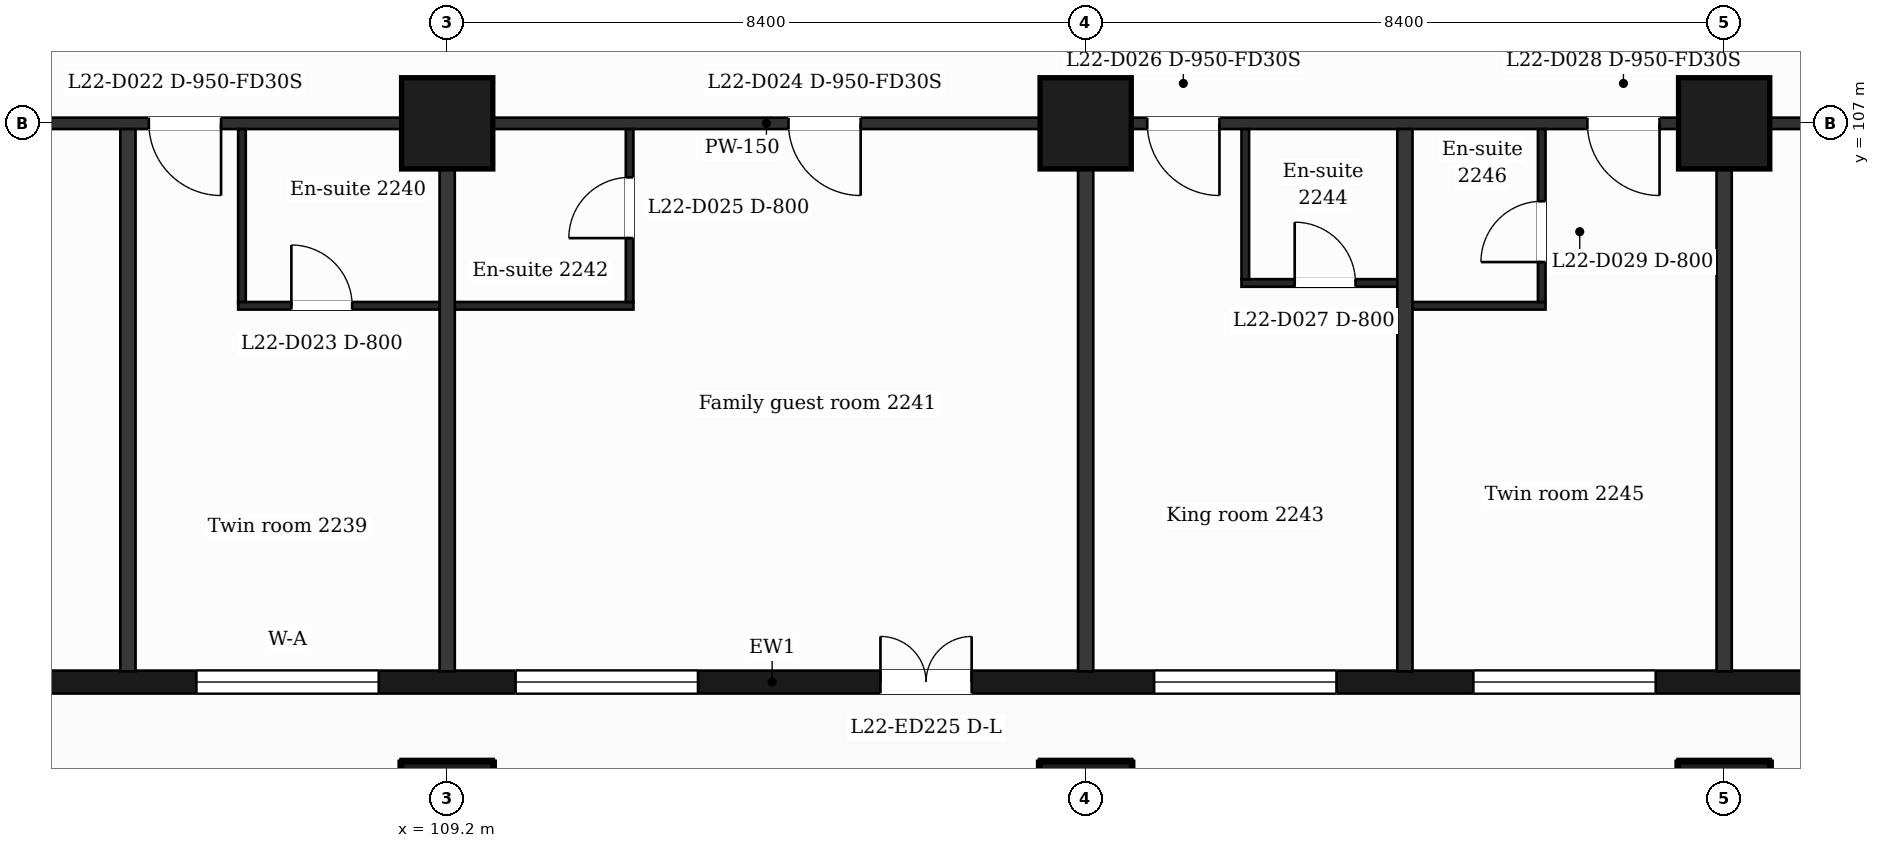
"""IFC4 building model, lengths in metres.
Left out: names, types, materials, properties, quantities, classifications, styles, units other than length and angle.
Written with IfcOpenShell. Run it as: python <this file> out.ifc"""

import sys

from ifc_helpers import new_model, si_unit, direction, frame, frame_2d, origin, origin_2d, place, context, subcontext, project, spatial, rectangle, extrude, element, fill, save


model = new_model("IFC4")
c1 = context("Model", 3, precision=1e-05, world=origin(), true_north=direction((0.0, 1.0)))
c2 = subcontext(c1, "Body", "Model", "MODEL_VIEW")
j1 = project(units=[si_unit("LENGTHUNIT", "METRE"), si_unit("PLANEANGLEUNIT", "RADIAN")], contexts=[c1])
p1 = place(None, origin())
s1 = spatial("IfcSite", under=j1, at=p1, CompositionType="ELEMENT")
p2 = place(p1, origin())
s2 = spatial("IfcBuilding", under=s1, at=p2, CompositionType="ELEMENT")
p3 = place(p2, frame((0.0, 0.0, 98.4)))
s3 = spatial("IfcBuildingStorey", under=s2, at=p3, CompositionType="ELEMENT", Elevation=98.4)
for number, where, z_axis, x_axis in (
    (1, (109.2, 98.0, 0.0), (0.0, 0.0, 1.0), (1.0, 0.0, 0.0)),
    (2, (117.6, 98.0, 0.0), (0.0, 0.0, 1.0), (1.0, 0.0, 0.0)),
    (3, (126.0, 98.0, 0.0), (0.0, 0.0, 1.0), (1.0, 0.0, 0.0)),
    (4, (109.2, 107.0, 0.0), (0.0, 0.0, 1.0), (1.0, 0.0, 0.0)),
    (5, (117.6, 107.0, 0.0), (0.0, 0.0, 1.0), (1.0, 0.0, 0.0)),
    (6, (126.0, 107.0, 0.0), (0.0, 0.0, 1.0), (1.0, 0.0, 0.0)),
):
    element("IfcColumn", number, at=place(p3, frame(where, z_axis=z_axis, x_axis=x_axis)), inside=s3, PredefinedType="COLUMN", context=c2, shape_type="SweptSolid", body=[
        extrude(rectangle(XDim=1.2, YDim=1.2, at=origin_2d()), origin(), (0.0, 0.0, 1.0), 3.7),
    ])
p4 = place(p3, frame((89.85, 99.65, 0.0), z_axis=(0.0, 0.0, 1.0), x_axis=(1.0, 0.0, 0.0)))
e7 = element("IfcWall", 7, at=p4, inside=s3, PredefinedType="SOLIDWALL", context=c2, shape_type="SweptSolid", body=[
    extrude(rectangle(XDim=47.25, YDim=0.3, at=frame_2d((23.625, 0.0))), origin(), (0.0, 0.0, 1.0), 3.38),
])
p5 = place(p4, frame((0.725, 0.0, 0.9)))
e8 = element("IfcOpeningElement", 8, at=p5, cuts=e7, PredefinedType="OPENING", context=c2, shape_type="SweptSolid", body=[
    extrude(rectangle(XDim=1.2, YDim=2.1, at=frame_2d((0.6, 1.05))), frame((0.0, 0.16, 0.0), z_axis=(0.0, -1.0, 0.0), x_axis=(1.0, 0.0, 0.0)), (0.0, 0.0, 1.0), 0.32),
])
p6 = place(p4, frame((3.45, 0.0, 0.9)))
e9 = element("IfcOpeningElement", 9, at=p6, cuts=e7, PredefinedType="OPENING", context=c2, shape_type="SweptSolid", body=[
    extrude(rectangle(XDim=2.4, YDim=2.1, at=frame_2d((1.2, 1.05))), frame((0.0, 0.16, 0.0), z_axis=(0.0, -1.0, 0.0), x_axis=(1.0, 0.0, 0.0)), (0.0, 0.0, 1.0), 0.32),
])
p7 = place(p4, frame((8.25, 0.0, 0.9)))
e10 = element("IfcOpeningElement", 10, at=p7, cuts=e7, PredefinedType="OPENING", context=c2, shape_type="SweptSolid", body=[
    extrude(rectangle(XDim=1.2, YDim=2.1, at=frame_2d((0.6, 1.05))), frame((0.0, 0.16, 0.0), z_axis=(0.0, -1.0, 0.0), x_axis=(1.0, 0.0, 0.0)), (0.0, 0.0, 1.0), 0.32),
])
p8 = place(p4, frame((12.45, 0.0, 0.9)))
e11 = element("IfcOpeningElement", 11, at=p8, cuts=e7, PredefinedType="OPENING", context=c2, shape_type="SweptSolid", body=[
    extrude(rectangle(XDim=1.2, YDim=2.1, at=frame_2d((0.6, 1.05))), frame((0.0, 0.16, 0.0), z_axis=(0.0, -1.0, 0.0), x_axis=(1.0, 0.0, 0.0)), (0.0, 0.0, 1.0), 0.32),
])
p9 = place(p4, frame((16.05, 0.0, 0.9)))
e12 = element("IfcOpeningElement", 12, at=p9, cuts=e7, PredefinedType="OPENING", context=c2, shape_type="SweptSolid", body=[
    extrude(rectangle(XDim=2.4, YDim=2.1, at=frame_2d((1.2, 1.05))), frame((0.0, 0.16, 0.0), z_axis=(0.0, -1.0, 0.0), x_axis=(1.0, 0.0, 0.0)), (0.0, 0.0, 1.0), 0.32),
])
p10 = place(p4, frame((20.25, 0.0, 0.9)))
e13 = element("IfcOpeningElement", 13, at=p10, cuts=e7, PredefinedType="OPENING", context=c2, shape_type="SweptSolid", body=[
    extrude(rectangle(XDim=2.4, YDim=2.1, at=frame_2d((1.2, 1.05))), frame((0.0, 0.16, 0.0), z_axis=(0.0, -1.0, 0.0), x_axis=(1.0, 0.0, 0.0)), (0.0, 0.0, 1.0), 0.32),
])
p11 = place(p4, frame((25.05, 0.0, 0.0)))
e14 = element("IfcOpeningElement", 14, at=p11, cuts=e7, PredefinedType="OPENING", context=c2, shape_type="SweptSolid", body=[
    extrude(rectangle(XDim=1.2, YDim=2.4, at=frame_2d((0.6, 1.2))), frame((0.0, 0.16, 0.0), z_axis=(0.0, -1.0, 0.0), x_axis=(1.0, 0.0, 0.0)), (0.0, 0.0, 1.0), 0.32),
])
p12 = place(p4, frame((28.65, 0.0, 0.9)))
e15 = element("IfcOpeningElement", 15, at=p12, cuts=e7, PredefinedType="OPENING", context=c2, shape_type="SweptSolid", body=[
    extrude(rectangle(XDim=2.4, YDim=2.1, at=frame_2d((1.2, 1.05))), frame((0.0, 0.16, 0.0), z_axis=(0.0, -1.0, 0.0), x_axis=(1.0, 0.0, 0.0)), (0.0, 0.0, 1.0), 0.32),
])
p13 = place(p4, frame((32.85, 0.0, 0.9)))
e16 = element("IfcOpeningElement", 16, at=p13, cuts=e7, PredefinedType="OPENING", context=c2, shape_type="SweptSolid", body=[
    extrude(rectangle(XDim=2.4, YDim=2.1, at=frame_2d((1.2, 1.05))), frame((0.0, 0.16, 0.0), z_axis=(0.0, -1.0, 0.0), x_axis=(1.0, 0.0, 0.0)), (0.0, 0.0, 1.0), 0.32),
])
p14 = place(p4, frame((37.65, 0.0, 0.9)))
e17 = element("IfcOpeningElement", 17, at=p14, cuts=e7, PredefinedType="OPENING", context=c2, shape_type="SweptSolid", body=[
    extrude(rectangle(XDim=1.2, YDim=2.1, at=frame_2d((0.6, 1.05))), frame((0.0, 0.16, 0.0), z_axis=(0.0, -1.0, 0.0), x_axis=(1.0, 0.0, 0.0)), (0.0, 0.0, 1.0), 0.32),
])
p15 = place(p4, frame((41.85, 0.0, 0.9)))
e18 = element("IfcOpeningElement", 18, at=p15, cuts=e7, PredefinedType="OPENING", context=c2, shape_type="SweptSolid", body=[
    extrude(rectangle(XDim=1.2, YDim=2.1, at=frame_2d((0.6, 1.05))), frame((0.0, 0.16, 0.0), z_axis=(0.0, -1.0, 0.0), x_axis=(1.0, 0.0, 0.0)), (0.0, 0.0, 1.0), 0.32),
])
p16 = place(p4, frame((45.25, 0.0, 0.9)))
e19 = element("IfcOpeningElement", 19, at=p16, cuts=e7, PredefinedType="OPENING", context=c2, shape_type="SweptSolid", body=[
    extrude(rectangle(XDim=1.2, YDim=2.1, at=frame_2d((0.6, 1.05))), frame((0.0, 0.16, 0.0), z_axis=(0.0, -1.0, 0.0), x_axis=(1.0, 0.0, 0.0)), (0.0, 0.0, 1.0), 0.32),
])
p17 = place(p3, frame((106.45, 104.6, 0.0), z_axis=(0.0, 0.0, 1.0), x_axis=(1.0, 0.0, 0.0)))
e20 = element("IfcWall", 20, at=p17, inside=s3, PredefinedType="PARTITIONING", context=c2, shape_type="SweptSolid", body=[
    extrude(rectangle(XDim=5.2, YDim=0.1, at=frame_2d((2.6, 0.0))), origin(), (0.0, 0.0, 1.0), 3.38),
])
p18 = place(p17, frame((0.7, 0.0, 0.0)))
e21 = element("IfcOpeningElement", 21, at=p18, cuts=e20, PredefinedType="OPENING", context=c2, shape_type="SweptSolid", body=[
    extrude(rectangle(XDim=0.8, YDim=2.1, at=frame_2d((0.4, 1.05))), frame((0.0, 0.06, 0.0), z_axis=(0.0, -1.0, 0.0), x_axis=(1.0, 0.0, 0.0)), (0.0, 0.0, 1.0), 0.12),
])
p19 = place(p3, frame((121.8, 104.6, 0.0), z_axis=(0.0, 0.0, 1.0), x_axis=(1.0, 0.0, 0.0)))
e22 = element("IfcWall", 22, at=p19, inside=s3, PredefinedType="PARTITIONING", context=c2, shape_type="SweptSolid", body=[
    extrude(rectangle(XDim=1.85, YDim=0.1, at=frame_2d((0.925, 0.0))), origin(), (0.0, 0.0, 1.0), 3.38),
])
p20 = place(p3, frame((119.65, 104.9, 0.0), z_axis=(0.0, 0.0, 1.0), x_axis=(1.0, 0.0, 0.0)))
e23 = element("IfcWall", 23, at=p20, inside=s3, PredefinedType="PARTITIONING", context=c2, shape_type="SweptSolid", body=[
    extrude(rectangle(XDim=2.15, YDim=0.1, at=frame_2d((1.075, 0.0))), origin(), (0.0, 0.0, 1.0), 3.38),
])
p21 = place(p20, frame((0.7, 0.0, 0.0)))
e24 = element("IfcOpeningElement", 24, at=p21, cuts=e23, PredefinedType="OPENING", context=c2, shape_type="SweptSolid", body=[
    extrude(rectangle(XDim=0.8, YDim=2.1, at=frame_2d((0.4, 1.05))), frame((0.0, 0.06, 0.0), z_axis=(0.0, -1.0, 0.0), x_axis=(1.0, 0.0, 0.0)), (0.0, 0.0, 1.0), 0.12),
])
p22 = place(p3, frame((87.018, 107.0, 0.0), z_axis=(0.0, 0.0, 1.0), x_axis=(1.0, 0.0, 0.0)))
e25 = element("IfcWall", 25, at=p22, inside=s3, PredefinedType="PARTITIONING", context=c2, shape_type="SweptSolid", body=[
    extrude(rectangle(XDim=52.765, YDim=0.15, at=frame_2d((26.382, 0.0))), origin(), (0.0, 0.0, 1.0), 3.38),
])
p23 = place(p22, frame((1.276, 0.0, 0.0)))
e26 = element("IfcOpeningElement", 26, at=p23, cuts=e25, PredefinedType="OPENING", context=c2, shape_type="SweptSolid", body=[
    extrude(rectangle(XDim=0.95, YDim=2.1, at=frame_2d((0.475, 1.05))), frame((0.0, 0.085, 0.0), z_axis=(0.0, -1.0, 0.0), x_axis=(1.0, 0.0, 0.0)), (0.0, 0.0, 1.0), 0.17),
])
p24 = place(p22, frame((6.152, 0.0, 0.0)))
e27 = element("IfcOpeningElement", 27, at=p24, cuts=e25, PredefinedType="OPENING", context=c2, shape_type="SweptSolid", body=[
    extrude(rectangle(XDim=0.95, YDim=2.1, at=frame_2d((0.475, 1.05))), frame((0.0, 0.085, 0.0), z_axis=(0.0, -1.0, 0.0), x_axis=(1.0, 0.0, 0.0)), (0.0, 0.0, 1.0), 0.17),
])
p25 = place(p22, frame((14.59, 0.0, 0.0)))
e28 = element("IfcOpeningElement", 28, at=p25, cuts=e25, PredefinedType="OPENING", context=c2, shape_type="SweptSolid", body=[
    extrude(rectangle(XDim=0.95, YDim=2.1, at=frame_2d((0.475, 1.05))), frame((0.0, 0.085, 0.0), z_axis=(0.0, -1.0, 0.0), x_axis=(1.0, 0.0, 0.0)), (0.0, 0.0, 1.0), 0.17),
])
p26 = place(p22, frame((18.257, 0.0, 0.0)))
e29 = element("IfcOpeningElement", 29, at=p26, cuts=e25, PredefinedType="OPENING", context=c2, shape_type="SweptSolid", body=[
    extrude(rectangle(XDim=0.95, YDim=2.1, at=frame_2d((0.475, 1.05))), frame((0.0, 0.085, 0.0), z_axis=(0.0, -1.0, 0.0), x_axis=(1.0, 0.0, 0.0)), (0.0, 0.0, 1.0), 0.17),
])
p27 = place(p22, frame((26.672, 0.0, 0.0)))
e30 = element("IfcOpeningElement", 30, at=p27, cuts=e25, PredefinedType="OPENING", context=c2, shape_type="SweptSolid", body=[
    extrude(rectangle(XDim=0.95, YDim=2.1, at=frame_2d((0.475, 1.05))), frame((0.0, 0.085, 0.0), z_axis=(0.0, -1.0, 0.0), x_axis=(1.0, 0.0, 0.0)), (0.0, 0.0, 1.0), 0.17),
])
p28 = place(p22, frame((31.392, 0.0, 0.0)))
e31 = element("IfcOpeningElement", 31, at=p28, cuts=e25, PredefinedType="OPENING", context=c2, shape_type="SweptSolid", body=[
    extrude(rectangle(XDim=0.95, YDim=2.1, at=frame_2d((0.475, 1.05))), frame((0.0, 0.085, 0.0), z_axis=(0.0, -1.0, 0.0), x_axis=(1.0, 0.0, 0.0)), (0.0, 0.0, 1.0), 0.17),
])
p29 = place(p22, frame((37.182, 0.0, 0.0)))
e32 = element("IfcOpeningElement", 32, at=p29, cuts=e25, PredefinedType="OPENING", context=c2, shape_type="SweptSolid", body=[
    extrude(rectangle(XDim=0.95, YDim=2.1, at=frame_2d((0.475, 1.05))), frame((0.0, 0.085, 0.0), z_axis=(0.0, -1.0, 0.0), x_axis=(1.0, 0.0, 0.0)), (0.0, 0.0, 1.0), 0.17),
])
p30 = place(p22, frame((41.762, 0.0, 0.0)))
e33 = element("IfcOpeningElement", 33, at=p30, cuts=e25, PredefinedType="OPENING", context=c2, shape_type="SweptSolid", body=[
    extrude(rectangle(XDim=0.95, YDim=2.1, at=frame_2d((0.475, 1.05))), frame((0.0, 0.085, 0.0), z_axis=(0.0, -1.0, 0.0), x_axis=(1.0, 0.0, 0.0)), (0.0, 0.0, 1.0), 0.17),
])
p31 = place(p22, frame((49.285, 0.0, 0.0)))
e34 = element("IfcOpeningElement", 34, at=p31, cuts=e25, PredefinedType="OPENING", context=c2, shape_type="SweptSolid", body=[
    extrude(rectangle(XDim=0.95, YDim=2.1, at=frame_2d((0.475, 1.05))), frame((0.0, 0.085, 0.0), z_axis=(0.0, -1.0, 0.0), x_axis=(1.0, 0.0, 0.0)), (0.0, 0.0, 1.0), 0.17),
])
p32 = place(p3, frame((105.0, 99.79, 0.0), z_axis=(0.0, 0.0, 1.0), x_axis=(0.0, 1.0, 0.0)))
e35 = element("IfcWall", 35, at=p32, inside=s3, PredefinedType="PARTITIONING", context=c2, shape_type="SweptSolid", body=[
    extrude(rectangle(XDim=7.135, YDim=0.2, at=frame_2d((3.567, 0.0))), origin(), (0.0, 0.0, 1.0), 3.38),
])
p33 = place(p3, frame((106.5, 104.65, 0.0), z_axis=(0.0, 0.0, 1.0), x_axis=(0.0, 1.0, 0.0)))
e36 = element("IfcWall", 36, at=p33, inside=s3, PredefinedType="PARTITIONING", context=c2, shape_type="SweptSolid", body=[
    extrude(rectangle(XDim=2.275, YDim=0.1, at=frame_2d((1.138, 0.0))), origin(), (0.0, 0.0, 1.0), 3.38),
])
p34 = place(p3, frame((109.2, 99.79, 0.0), z_axis=(0.0, 0.0, 1.0), x_axis=(0.0, 1.0, 0.0)))
e37 = element("IfcWall", 37, at=p34, inside=s3, PredefinedType="PARTITIONING", context=c2, shape_type="SweptSolid", body=[
    extrude(rectangle(XDim=7.135, YDim=0.2, at=frame_2d((3.567, 0.0))), origin(), (0.0, 0.0, 1.0), 3.38),
])
p35 = place(p3, frame((111.6, 104.65, 0.0), z_axis=(0.0, 0.0, 1.0), x_axis=(0.0, 1.0, 0.0)))
e38 = element("IfcWall", 38, at=p35, inside=s3, PredefinedType="PARTITIONING", context=c2, shape_type="SweptSolid", body=[
    extrude(rectangle(XDim=2.275, YDim=0.1, at=frame_2d((1.138, 0.0))), origin(), (0.0, 0.0, 1.0), 3.38),
])
p36 = place(p35, frame((0.84, 0.0, 0.0)))
e39 = element("IfcOpeningElement", 39, at=p36, cuts=e38, PredefinedType="OPENING", context=c2, shape_type="SweptSolid", body=[
    extrude(rectangle(XDim=0.8, YDim=2.1, at=frame_2d((0.4, 1.05))), frame((0.0, 0.06, 0.0), z_axis=(0.0, -1.0, 0.0), x_axis=(1.0, 0.0, 0.0)), (0.0, 0.0, 1.0), 0.12),
])
p37 = place(p3, frame((117.6, 99.79, 0.0), z_axis=(0.0, 0.0, 1.0), x_axis=(0.0, 1.0, 0.0)))
e40 = element("IfcWall", 40, at=p37, inside=s3, PredefinedType="PARTITIONING", context=c2, shape_type="SweptSolid", body=[
    extrude(rectangle(XDim=7.135, YDim=0.2, at=frame_2d((3.567, 0.0))), origin(), (0.0, 0.0, 1.0), 3.38),
])
p38 = place(p3, frame((119.7, 104.95, 0.0), z_axis=(0.0, 0.0, 1.0), x_axis=(0.0, 1.0, 0.0)))
e41 = element("IfcWall", 41, at=p38, inside=s3, PredefinedType="PARTITIONING", context=c2, shape_type="SweptSolid", body=[
    extrude(rectangle(XDim=1.975, YDim=0.1, at=frame_2d((0.988, 0.0))), origin(), (0.0, 0.0, 1.0), 3.38),
])
p39 = place(p3, frame((121.8, 99.79, 0.0), z_axis=(0.0, 0.0, 1.0), x_axis=(0.0, 1.0, 0.0)))
e42 = element("IfcWall", 42, at=p39, inside=s3, PredefinedType="PARTITIONING", context=c2, shape_type="SweptSolid", body=[
    extrude(rectangle(XDim=7.135, YDim=0.2, at=frame_2d((3.567, 0.0))), origin(), (0.0, 0.0, 1.0), 3.38),
])
p40 = place(p3, frame((123.6, 104.65, 0.0), z_axis=(0.0, 0.0, 1.0), x_axis=(0.0, 1.0, 0.0)))
e43 = element("IfcWall", 43, at=p40, inside=s3, PredefinedType="PARTITIONING", context=c2, shape_type="SweptSolid", body=[
    extrude(rectangle(XDim=2.275, YDim=0.1, at=frame_2d((1.138, 0.0))), origin(), (0.0, 0.0, 1.0), 3.38),
])
p41 = place(p40, frame((0.525, 0.0, 0.0)))
e44 = element("IfcOpeningElement", 44, at=p41, cuts=e43, PredefinedType="OPENING", context=c2, shape_type="SweptSolid", body=[
    extrude(rectangle(XDim=0.8, YDim=2.1, at=frame_2d((0.4, 1.05))), frame((0.0, 0.06, 0.0), z_axis=(0.0, -1.0, 0.0), x_axis=(1.0, 0.0, 0.0)), (0.0, 0.0, 1.0), 0.12),
])
p42 = place(p3, frame((126.0, 99.79, 0.0), z_axis=(0.0, 0.0, 1.0), x_axis=(0.0, 1.0, 0.0)))
e45 = element("IfcWall", 45, at=p42, inside=s3, PredefinedType="PARTITIONING", context=c2, shape_type="SweptSolid", body=[
    extrude(rectangle(XDim=7.135, YDim=0.2, at=frame_2d((3.567, 0.0))), origin(), (0.0, 0.0, 1.0), 3.38),
])
p43 = place(p9, origin())
e46 = element("IfcWindow", 46, at=p43, inside=s3, PartitioningType="SINGLE_PANEL", PredefinedType="WINDOW", context=c2, shape_type="SweptSolid", body=[
    extrude(rectangle(XDim=2.4, YDim=2.1, at=frame_2d((1.2, 1.05))), frame((0.0, 0.03, 0.0), z_axis=(0.0, -1.0, 0.0), x_axis=(1.0, 0.0, 0.0)), (0.0, 0.0, 1.0), 0.06),
])
fill(e12, e46)
p44 = place(p10, origin())
e47 = element("IfcWindow", 47, at=p44, inside=s3, PartitioningType="SINGLE_PANEL", PredefinedType="WINDOW", context=c2, shape_type="SweptSolid", body=[
    extrude(rectangle(XDim=2.4, YDim=2.1, at=frame_2d((1.2, 1.05))), frame((0.0, 0.03, 0.0), z_axis=(0.0, -1.0, 0.0), x_axis=(1.0, 0.0, 0.0)), (0.0, 0.0, 1.0), 0.06),
])
fill(e13, e47)
p45 = place(p11, origin())
e48 = element("IfcDoor", 48, at=p45, inside=s3, OperationType="DOUBLE_DOOR_SINGLE_SWING", PredefinedType="DOOR", context=c2, shape_type="SweptSolid", body=[
    extrude(rectangle(XDim=1.2, YDim=2.4, at=frame_2d((0.6, 1.2))), frame((0.0, 0.025, 0.0), z_axis=(0.0, -1.0, 0.0), x_axis=(1.0, 0.0, 0.0)), (0.0, 0.0, 1.0), 0.05),
])
fill(e14, e48)
p46 = place(p12, origin())
e49 = element("IfcWindow", 49, at=p46, inside=s3, PartitioningType="SINGLE_PANEL", PredefinedType="WINDOW", context=c2, shape_type="SweptSolid", body=[
    extrude(rectangle(XDim=2.4, YDim=2.1, at=frame_2d((1.2, 1.05))), frame((0.0, 0.03, 0.0), z_axis=(0.0, -1.0, 0.0), x_axis=(1.0, 0.0, 0.0)), (0.0, 0.0, 1.0), 0.06),
])
fill(e15, e49)
p47 = place(p13, origin())
e50 = element("IfcWindow", 50, at=p47, inside=s3, PartitioningType="SINGLE_PANEL", PredefinedType="WINDOW", context=c2, shape_type="SweptSolid", body=[
    extrude(rectangle(XDim=2.4, YDim=2.1, at=frame_2d((1.2, 1.05))), frame((0.0, 0.03, 0.0), z_axis=(0.0, -1.0, 0.0), x_axis=(1.0, 0.0, 0.0)), (0.0, 0.0, 1.0), 0.06),
])
fill(e16, e50)
p48 = place(p26, origin())
e51 = element("IfcDoor", 51, at=p48, inside=s3, OperationType="SINGLE_SWING_RIGHT", PredefinedType="DOOR", context=c2, shape_type="SweptSolid", body=[
    extrude(rectangle(XDim=0.95, YDim=2.1, at=frame_2d((0.475, 1.05))), frame((0.0, 0.025, 0.0), z_axis=(0.0, -1.0, 0.0), x_axis=(1.0, 0.0, 0.0)), (0.0, 0.0, 1.0), 0.05),
])
fill(e29, e51)
p49 = place(p18, origin())
e52 = element("IfcDoor", 52, at=p49, inside=s3, OperationType="SINGLE_SWING_LEFT", PredefinedType="DOOR", context=c2, shape_type="SweptSolid", body=[
    extrude(rectangle(XDim=0.8, YDim=2.1, at=frame_2d((0.4, 1.05))), frame((0.0, 0.025, 0.0), z_axis=(0.0, -1.0, 0.0), x_axis=(1.0, 0.0, 0.0)), (0.0, 0.0, 1.0), 0.05),
])
fill(e21, e52)
p50 = place(p27, origin())
e53 = element("IfcDoor", 53, at=p50, inside=s3, OperationType="SINGLE_SWING_RIGHT", PredefinedType="DOOR", context=c2, shape_type="SweptSolid", body=[
    extrude(rectangle(XDim=0.95, YDim=2.1, at=frame_2d((0.475, 1.05))), frame((0.0, 0.025, 0.0), z_axis=(0.0, -1.0, 0.0), x_axis=(1.0, 0.0, 0.0)), (0.0, 0.0, 1.0), 0.05),
])
fill(e30, e53)
p51 = place(p36, origin())
e54 = element("IfcDoor", 54, at=p51, inside=s3, OperationType="SINGLE_SWING_LEFT", PredefinedType="DOOR", context=c2, shape_type="SweptSolid", body=[
    extrude(rectangle(XDim=0.8, YDim=2.1, at=frame_2d((0.4, 1.05))), frame((0.0, 0.025, 0.0), z_axis=(0.0, -1.0, 0.0), x_axis=(1.0, 0.0, 0.0)), (0.0, 0.0, 1.0), 0.05),
])
fill(e39, e54)
p52 = place(p28, origin())
e55 = element("IfcDoor", 55, at=p52, inside=s3, OperationType="SINGLE_SWING_RIGHT", PredefinedType="DOOR", context=c2, shape_type="SweptSolid", body=[
    extrude(rectangle(XDim=0.95, YDim=2.1, at=frame_2d((0.475, 1.05))), frame((0.0, 0.025, 0.0), z_axis=(0.0, -1.0, 0.0), x_axis=(1.0, 0.0, 0.0)), (0.0, 0.0, 1.0), 0.05),
])
fill(e31, e55)
p53 = place(p21, origin())
e56 = element("IfcDoor", 56, at=p53, inside=s3, OperationType="SINGLE_SWING_LEFT", PredefinedType="DOOR", context=c2, shape_type="SweptSolid", body=[
    extrude(rectangle(XDim=0.8, YDim=2.1, at=frame_2d((0.4, 1.05))), frame((0.0, 0.025, 0.0), z_axis=(0.0, -1.0, 0.0), x_axis=(1.0, 0.0, 0.0)), (0.0, 0.0, 1.0), 0.05),
])
fill(e24, e56)
p54 = place(p29, origin())
e57 = element("IfcDoor", 57, at=p54, inside=s3, OperationType="SINGLE_SWING_RIGHT", PredefinedType="DOOR", context=c2, shape_type="SweptSolid", body=[
    extrude(rectangle(XDim=0.95, YDim=2.1, at=frame_2d((0.475, 1.05))), frame((0.0, 0.025, 0.0), z_axis=(0.0, -1.0, 0.0), x_axis=(1.0, 0.0, 0.0)), (0.0, 0.0, 1.0), 0.05),
])
fill(e32, e57)
p55 = place(p41, origin())
e58 = element("IfcDoor", 58, at=p55, inside=s3, OperationType="SINGLE_SWING_LEFT", PredefinedType="DOOR", context=c2, shape_type="SweptSolid", body=[
    extrude(rectangle(XDim=0.8, YDim=2.1, at=frame_2d((0.4, 1.05))), frame((0.0, 0.025, 0.0), z_axis=(0.0, -1.0, 0.0), x_axis=(1.0, 0.0, 0.0)), (0.0, 0.0, 1.0), 0.05),
])
fill(e44, e58)
save(model, sys.argv[1])
